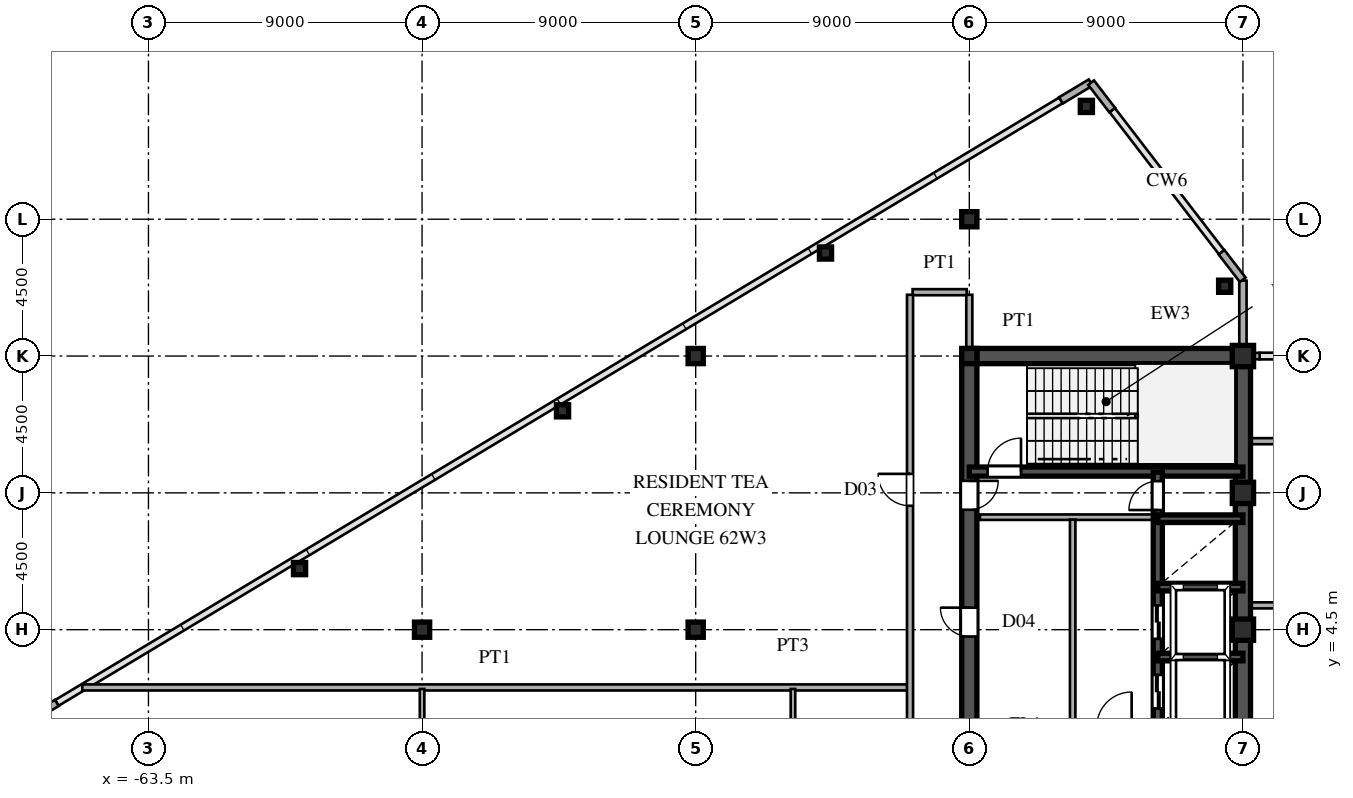
"""IFC4 building model, lengths in metres.
Left out: names, types, materials, properties, quantities, classifications, styles, units other than length and angle.
Written with IfcOpenShell. Run it as: python <this file> out.ifc"""

import sys

from ifc_helpers import new_model, si_unit, direction, frame, frame_2d, origin, origin_2d, place, context, subcontext, project, spatial, rectangle, hollow_rectangle, i_section, extrude, source, transform, mapped, element, fill, save


model = new_model("IFC4")
c1 = context("Model", 3, precision=1e-05, world=origin(), true_north=direction((0.0, 1.0)))
c2 = subcontext(c1, "Body", "Model", "MODEL_VIEW")
j1 = project(units=[si_unit("LENGTHUNIT", "METRE"), si_unit("PLANEANGLEUNIT", "RADIAN")], contexts=[c1])
p1 = place(None, origin())
s1 = spatial("IfcSite", under=j1, at=p1, CompositionType="ELEMENT")
p2 = place(p1, origin())
s2 = spatial("IfcBuilding", under=s1, at=p2, CompositionType="ELEMENT")
p3 = place(p2, frame((0.0, 0.0, 234.6)))
s3 = spatial("IfcBuildingStorey", under=s2, at=p3, CompositionType="ELEMENT", Elevation=234.6)
m1 = source(origin(), c2, "Body", "SweptSolid", [
    extrude(hollow_rectangle(XDim=0.7, YDim=0.7, WallThickness=0.03, at=origin_2d()), origin(), (0.0, 0.0, 1.0), 4.8),
])
for number, where, z_axis, x_axis in (
    (1, (-27.5, 4.5, 0.0), (0.0, 0.0, 1.0), (1.0, 0.0, 0.0)),
    (2, (-27.5, 9.0, 0.0), (0.0, 0.0, 1.0), (1.0, 0.0, 0.0)),
    (3, (-27.5, 13.5, 0.0), (0.0, 0.0, 1.0), (1.0, 0.0, 0.0)),
):
    element("IfcColumn", number, at=place(p3, frame(where, z_axis=z_axis, x_axis=x_axis)), inside=s3, PredefinedType="COLUMN", context=c2, shape_type="MappedRepresentation", body=[
        mapped(m1, transform((0.0, 0.0, 0.0), scale=1.0)),
    ])
m2 = source(origin(), c2, "Body", "SweptSolid", [
    extrude(i_section(OverallWidth=0.5, OverallDepth=0.5, WebThickness=0.02, FlangeThickness=0.032, at=origin_2d()), origin(), (0.0, 0.0, 1.0), 4.8),
])
for number, where, z_axis, x_axis in (
    (4, (-36.5, 13.5, 0.0), (0.0, 0.0, 1.0), (1.0, 0.0, 0.0)),
    (5, (-36.5, 18.0, 0.0), (0.0, 0.0, 1.0), (1.0, 0.0, 0.0)),
    (6, (-45.5, 4.5, 0.0), (0.0, 0.0, 1.0), (1.0, 0.0, 0.0)),
    (7, (-45.5, 13.5, 0.0), (0.0, 0.0, 1.0), (1.0, 0.0, 0.0)),
    (8, (-54.5, 4.5, 0.0), (0.0, 0.0, 1.0), (1.0, 0.0, 0.0)),
):
    element("IfcColumn", number, at=place(p3, frame(where, z_axis=z_axis, x_axis=x_axis)), inside=s3, PredefinedType="COLUMN", context=c2, shape_type="MappedRepresentation", body=[
        mapped(m2, transform((0.0, 0.0, 0.0), scale=1.0)),
    ])
m3 = source(origin(), c2, "Body", "SweptSolid", [
    extrude(hollow_rectangle(XDim=0.4, YDim=0.4, WallThickness=0.016, at=origin_2d()), origin(), (0.0, 0.0, 1.0), 4.8),
])
for number, where, z_axis, x_axis in (
    (9, (-28.1, 15.796, 0.0), (0.0, 0.0, 1.0), (1.0, 0.0, 0.0)),
    (10, (-32.65, 21.71, 0.0), (0.0, 0.0, 1.0), (1.0, 0.0, 0.0)),
    (11, (-41.23, 16.889, 0.0), (0.0, 0.0, 1.0), (1.0, 0.0, 0.0)),
    (12, (-49.88, 11.699, 0.0), (0.0, 0.0, 1.0), (1.0, 0.0, 0.0)),
    (13, (-58.53, 6.509, 0.0), (0.0, 0.0, 1.0), (1.0, 0.0, 0.0)),
):
    element("IfcColumn", number, at=place(p3, frame(where, z_axis=z_axis, x_axis=x_axis)), inside=s3, PredefinedType="COLUMN", context=c2, shape_type="MappedRepresentation", body=[
        mapped(m3, transform((0.0, 0.0, 0.0), scale=1.0)),
    ])
p4 = place(p3, frame((-27.5, 13.755, 0.0), z_axis=(0.0, 0.0, 1.0), x_axis=(0.0, 1.0, 0.0)))
e14 = element("IfcWall", 14, at=p4, inside=s3, PredefinedType="SOLIDWALL", context=c2, shape_type="SweptSolid", body=[
    extrude(rectangle(XDim=0.62, YDim=0.24, at=frame_2d((0.31, 0.0))), origin(), (0.0, 0.0, 1.0), 4.08),
])
p5 = place(p3, frame((-27.5, 14.375, 0.0), z_axis=(0.0, 0.0, 1.0), x_axis=(0.0, 1.0, 0.0)))
e15 = element("IfcWall", 15, at=p5, inside=s3, PredefinedType="SOLIDWALL", context=c2, shape_type="SweptSolid", body=[
    extrude(rectangle(XDim=1.605, YDim=0.24, at=frame_2d((0.803, 0.0))), origin(), (0.0, 0.0, 1.0), 4.58),
])
for number, where, z_axis, x_axis in (
    (16, (-27.506, 16.008, 0.0), (0.0, 0.0, 1.0), (-0.61, 0.793, 0.0)),
    (17, (-31.799, 21.588, 0.0), (0.0, 0.0, 1.0), (-0.61, 0.793, 0.0)),
    (18, (-32.509, 22.495, 0.0), (0.0, 0.0, 1.0), (-0.857, -0.515, 0.0)),
    (19, (-66.514, 2.092, 0.0), (0.0, 0.0, 1.0), (-0.857, -0.515, 0.0)),
):
    element("IfcWall", number, at=place(p3, frame(where, z_axis=z_axis, x_axis=x_axis)), inside=s3, PredefinedType="SOLIDWALL", context=c2, shape_type="SweptSolid", body=[
        extrude(rectangle(XDim=1.14, YDim=0.24, at=frame_2d((0.57, 0.0))), origin(), (0.0, 0.0, 1.0), 4.58),
    ])
p6 = place(p3, frame((-27.49, 13.5, 0.0), z_axis=(0.0, 0.0, 1.0), x_axis=(1.0, 0.0, 0.0)))
e20 = element("IfcWall", 20, at=p6, inside=s3, PredefinedType="SOLIDWALL", context=c2, shape_type="SweptSolid", body=[
    extrude(rectangle(XDim=0.54, YDim=0.21, at=frame_2d((0.27, 0.0))), origin(), (0.0, 0.0, 1.0), 2.78),
])
p7 = place(p3, frame((-27.5, 1.3, 0.0), z_axis=(0.0, 0.0, 1.0), x_axis=(0.0, 1.0, 0.0)))
e21 = element("IfcWall", 21, at=p7, inside=s3, PredefinedType="SHEAR", context=c2, shape_type="SweptSolid", body=[
    extrude(rectangle(XDim=12.2, YDim=0.5, at=frame_2d((6.1, 0.0))), origin(), (0.0, 0.0, 1.0), 4.58),
])
p8 = place(p3, frame((-36.5, 13.5, 0.0), z_axis=(0.0, 0.0, 1.0), x_axis=(1.0, 0.0, 0.0)))
e22 = element("IfcWall", 22, at=p8, inside=s3, PredefinedType="SHEAR", context=c2, shape_type="SweptSolid", body=[
    extrude(rectangle(XDim=9.0, YDim=0.5, at=frame_2d((4.5, 0.0))), origin(), (0.0, 0.0, 1.0), 4.58),
])
p9 = place(p3, frame((-36.5, 8.2, 0.0), z_axis=(0.0, 0.0, 1.0), x_axis=(0.0, 1.0, 0.0)))
e23 = element("IfcWall", 23, at=p9, inside=s3, PredefinedType="SHEAR", context=c2, shape_type="SweptSolid", body=[
    extrude(rectangle(XDim=5.45, YDim=0.5, at=frame_2d((2.725, 0.0))), origin(), (0.0, 0.0, 1.0), 4.58),
])
p10 = place(p9, frame((0.245, 0.0, 0.0)))
e24 = element("IfcOpeningElement", 24, at=p10, cuts=e23, PredefinedType="OPENING", context=c2, shape_type="SweptSolid", body=[
    extrude(rectangle(XDim=0.95, YDim=2.15, at=frame_2d((0.475, 1.075))), frame((0.0, 0.26, 0.0), z_axis=(0.0, -1.0, 0.0), x_axis=(1.0, 0.0, 0.0)), (0.0, 0.0, 1.0), 0.52),
])
p11 = place(p3, frame((-36.5, 1.3, 0.0), z_axis=(0.0, 0.0, 1.0), x_axis=(0.0, 1.0, 0.0)))
e25 = element("IfcWall", 25, at=p11, inside=s3, PredefinedType="SHEAR", context=c2, shape_type="SweptSolid", body=[
    extrude(rectangle(XDim=6.9, YDim=0.5, at=frame_2d((3.45, 0.0))), origin(), (0.0, 0.0, 1.0), 4.58),
])
p12 = place(p11, frame((2.975, 0.0, 0.0)))
e26 = element("IfcOpeningElement", 26, at=p12, cuts=e25, PredefinedType="OPENING", context=c2, shape_type="SweptSolid", body=[
    extrude(rectangle(XDim=0.95, YDim=2.15, at=frame_2d((0.475, 1.075))), frame((0.0, 0.26, 0.0), z_axis=(0.0, -1.0, 0.0), x_axis=(1.0, 0.0, 0.0)), (0.0, 0.0, 1.0), 0.52),
])
p13 = place(p3, frame((-36.5, 9.7, 0.0), z_axis=(0.0, 0.0, 1.0), x_axis=(1.0, 0.0, 0.0)))
e27 = element("IfcWall", 27, at=p13, inside=s3, PredefinedType="SHEAR", context=c2, shape_type="SweptSolid", body=[
    extrude(rectangle(XDim=9.0, YDim=0.3, at=frame_2d((4.5, 0.0))), origin(), (0.0, 0.0, 1.0), 4.58),
])
p14 = place(p13, frame((0.6, 0.0, 0.0)))
e28 = element("IfcOpeningElement", 28, at=p14, cuts=e27, PredefinedType="OPENING", context=c2, shape_type="SweptSolid", body=[
    extrude(rectangle(XDim=1.1, YDim=2.2, at=frame_2d((0.55, 1.1))), frame((0.0, 0.16, 0.0), z_axis=(0.0, -1.0, 0.0), x_axis=(1.0, 0.0, 0.0)), (0.0, 0.0, 1.0), 0.32),
])
for number, where, z_axis, x_axis in (
    (29, (-30.3, 3.6, 0.0), (0.0, 0.0, 1.0), (1.0, 0.0, 0.0)),
    (30, (-30.3, 5.9, 0.0), (0.0, 0.0, 1.0), (1.0, 0.0, 0.0)),
    (31, (-30.3, 8.15, 0.0), (0.0, 0.0, 1.0), (1.0, 0.0, 0.0)),
):
    element("IfcWall", number, at=place(p3, frame(where, z_axis=z_axis, x_axis=x_axis)), inside=s3, PredefinedType="SHEAR", context=c2, shape_type="SweptSolid", body=[
        extrude(rectangle(XDim=2.8, YDim=0.25, at=frame_2d((1.4, 0.0))), origin(), (0.0, 0.0, 1.0), 4.58),
    ])
p15 = place(p3, frame((-30.3, 1.32, 0.0), z_axis=(0.0, 0.0, 1.0), x_axis=(0.0, 1.0, 0.0)))
e32 = element("IfcWall", 32, at=p15, inside=s3, PredefinedType="SHEAR", context=c2, shape_type="SweptSolid", body=[
    extrude(rectangle(XDim=2.28, YDim=0.3, at=frame_2d((1.14, 0.0))), origin(), (0.0, 0.0, 1.0), 4.58),
])
p16 = place(p15, frame((0.59, 0.0, 0.0)))
e33 = element("IfcOpeningElement", 33, at=p16, cuts=e32, PredefinedType="OPENING", context=c2, shape_type="SweptSolid", body=[
    extrude(rectangle(XDim=1.1, YDim=2.2, at=frame_2d((0.55, 1.1))), frame((0.0, 0.16, 0.0), z_axis=(0.0, -1.0, 0.0), x_axis=(1.0, 0.0, 0.0)), (0.0, 0.0, 1.0), 0.32),
])
p17 = place(p3, frame((-30.3, 3.6, 0.0), z_axis=(0.0, 0.0, 1.0), x_axis=(0.0, 1.0, 0.0)))
e34 = element("IfcWall", 34, at=p17, inside=s3, PredefinedType="SHEAR", context=c2, shape_type="SweptSolid", body=[
    extrude(rectangle(XDim=2.3, YDim=0.3, at=frame_2d((1.15, 0.0))), origin(), (0.0, 0.0, 1.0), 4.58),
])
p18 = place(p17, frame((0.6, 0.0, 0.0)))
e35 = element("IfcOpeningElement", 35, at=p18, cuts=e34, PredefinedType="OPENING", context=c2, shape_type="SweptSolid", body=[
    extrude(rectangle(XDim=1.1, YDim=2.2, at=frame_2d((0.55, 1.1))), frame((0.0, 0.16, 0.0), z_axis=(0.0, -1.0, 0.0), x_axis=(1.0, 0.0, 0.0)), (0.0, 0.0, 1.0), 0.32),
])
p19 = place(p3, frame((-30.3, 5.9, 0.0), z_axis=(0.0, 0.0, 1.0), x_axis=(0.0, 1.0, 0.0)))
e36 = element("IfcWall", 36, at=p19, inside=s3, PredefinedType="SHEAR", context=c2, shape_type="SweptSolid", body=[
    extrude(rectangle(XDim=2.25, YDim=0.3, at=frame_2d((1.125, 0.0))), origin(), (0.0, 0.0, 1.0), 4.58),
])
p20 = place(p3, frame((-30.3, 8.15, 0.0), z_axis=(0.0, 0.0, 1.0), x_axis=(0.0, 1.0, 0.0)))
e37 = element("IfcWall", 37, at=p20, inside=s3, PredefinedType="SHEAR", context=c2, shape_type="SweptSolid", body=[
    extrude(rectangle(XDim=1.53, YDim=0.3, at=frame_2d((0.765, 0.0))), origin(), (0.0, 0.0, 1.0), 4.58),
])
p21 = place(p20, frame((0.285, 0.0, 0.0)))
e38 = element("IfcOpeningElement", 38, at=p21, cuts=e37, PredefinedType="OPENING", context=c2, shape_type="SweptSolid", body=[
    extrude(rectangle(XDim=0.95, YDim=2.15, at=frame_2d((0.475, 1.075))), frame((0.0, 0.16, 0.0), z_axis=(0.0, -1.0, 0.0), x_axis=(1.0, 0.0, 0.0)), (0.0, 0.0, 1.0), 0.32),
])
p22 = place(p3, frame((-36.15, 8.2, 0.0), z_axis=(0.0, 0.0, 1.0), x_axis=(1.0, 0.0, 0.0)))
e39 = element("IfcWall", 39, at=p22, inside=s3, PredefinedType="PARTITIONING", context=c2, shape_type="SweptSolid", body=[
    extrude(rectangle(XDim=5.7, YDim=0.18, at=frame_2d((2.85, 0.0))), origin(), (0.0, 0.0, 1.0), 4.58),
])
p23 = place(p3, frame((-33.1, 1.38, 0.0), z_axis=(0.0, 0.0, 1.0), x_axis=(0.0, 1.0, 0.0)))
e40 = element("IfcWall", 40, at=p23, inside=s3, PredefinedType="PARTITIONING", context=c2, shape_type="SweptSolid", body=[
    extrude(rectangle(XDim=6.74, YDim=0.18, at=frame_2d((3.37, 0.0))), origin(), (0.0, 0.0, 1.0), 4.58),
])
p24 = place(p3, frame((-65.676, 2.6, 0.0), z_axis=(0.0, 0.0, 1.0), x_axis=(1.0, 0.0, 0.0)))
e41 = element("IfcWall", 41, at=p24, inside=s3, PredefinedType="PARTITIONING", context=c2, shape_type="SweptSolid", body=[
    extrude(rectangle(XDim=27.146, YDim=0.2, at=frame_2d((13.573, 0.0))), origin(), (0.0, 0.0, 1.0), 4.58),
])
p25 = place(p3, frame((-27.245, 5.3, 0.0), z_axis=(0.0, 0.0, 1.0), x_axis=(1.0, 0.0, 0.0)))
e42 = element("IfcWall", 42, at=p25, inside=s3, PredefinedType="PARTITIONING", context=c2, shape_type="SweptSolid", body=[
    extrude(rectangle(XDim=54.49, YDim=0.2, at=frame_2d((27.245, 0.0))), origin(), (0.0, 0.0, 1.0), 4.58),
])
p26 = place(p25, frame((25.77, 0.0, 0.0)))
e43 = element("IfcOpeningElement", 43, at=p26, cuts=e42, PredefinedType="OPENING", context=c2, shape_type="SweptSolid", body=[
    extrude(rectangle(XDim=1.15, YDim=2.2, at=frame_2d((0.575, 1.1))), frame((0.0, 0.11, 0.0), z_axis=(0.0, -1.0, 0.0), x_axis=(1.0, 0.0, 0.0)), (0.0, 0.0, 1.0), 0.22),
])
p27 = place(p25, frame((35.17, 0.0, 0.0)))
e44 = element("IfcOpeningElement", 44, at=p27, cuts=e42, PredefinedType="OPENING", context=c2, shape_type="SweptSolid", body=[
    extrude(rectangle(XDim=1.15, YDim=2.2, at=frame_2d((0.575, 1.1))), frame((0.0, 0.11, 0.0), z_axis=(0.0, -1.0, 0.0), x_axis=(1.0, 0.0, 0.0)), (0.0, 0.0, 1.0), 0.22),
])
p28 = place(p25, frame((17.67, 0.0, 0.0)))
e45 = element("IfcOpeningElement", 45, at=p28, cuts=e42, PredefinedType="OPENING", context=c2, shape_type="SweptSolid", body=[
    extrude(rectangle(XDim=1.15, YDim=2.2, at=frame_2d((0.575, 1.1))), frame((0.0, 0.11, 0.0), z_axis=(0.0, -1.0, 0.0), x_axis=(1.0, 0.0, 0.0)), (0.0, 0.0, 1.0), 0.22),
])
p29 = place(p25, frame((46.055, 0.0, 0.0)))
e46 = element("IfcOpeningElement", 46, at=p29, cuts=e42, PredefinedType="OPENING", context=c2, shape_type="SweptSolid", body=[
    extrude(rectangle(XDim=0.88, YDim=2.1, at=frame_2d((0.44, 1.05))), frame((0.0, 0.11, 0.0), z_axis=(0.0, -1.0, 0.0), x_axis=(1.0, 0.0, 0.0)), (0.0, 0.0, 1.0), 0.22),
])
p30 = place(p25, frame((51.405, 0.0, 0.0)))
e47 = element("IfcOpeningElement", 47, at=p30, cuts=e42, PredefinedType="OPENING", context=c2, shape_type="SweptSolid", body=[
    extrude(rectangle(XDim=0.88, YDim=2.1, at=frame_2d((0.44, 1.05))), frame((0.0, 0.11, 0.0), z_axis=(0.0, -1.0, 0.0), x_axis=(1.0, 0.0, 0.0)), (0.0, 0.0, 1.0), 0.22),
])
p31 = place(p3, frame((-27.245, 10.7, 0.0), z_axis=(0.0, 0.0, 1.0), x_axis=(1.0, 0.0, 0.0)))
e48 = element("IfcWall", 48, at=p31, inside=s3, PredefinedType="PARTITIONING", context=c2, shape_type="SweptSolid", body=[
    extrude(rectangle(XDim=54.49, YDim=0.2, at=frame_2d((27.245, 0.0))), origin(), (0.0, 0.0, 1.0), 4.58),
])
p32 = place(p31, frame((25.77, 0.0, 0.0)))
e49 = element("IfcOpeningElement", 49, at=p32, cuts=e48, PredefinedType="OPENING", context=c2, shape_type="SweptSolid", body=[
    extrude(rectangle(XDim=1.15, YDim=2.2, at=frame_2d((0.575, 1.1))), frame((0.0, 0.11, 0.0), z_axis=(0.0, -1.0, 0.0), x_axis=(1.0, 0.0, 0.0)), (0.0, 0.0, 1.0), 0.22),
])
p33 = place(p3, frame((-38.365, 15.6, 0.0), z_axis=(0.0, 0.0, 1.0), x_axis=(1.0, 0.0, 0.0)))
e50 = element("IfcWall", 50, at=p33, inside=s3, PredefinedType="PARTITIONING", context=c2, shape_type="SweptSolid", body=[
    extrude(rectangle(XDim=1.78, YDim=0.2, at=frame_2d((0.89, 0.0))), origin(), (0.0, 0.0, 1.0), 4.58),
])
p34 = place(p3, frame((-54.5, -9.335, 0.0), z_axis=(0.0, 0.0, 1.0), x_axis=(0.0, 1.0, 0.0)))
e51 = element("IfcWall", 51, at=p34, inside=s3, PredefinedType="PARTITIONING", context=c2, shape_type="SweptSolid", body=[
    extrude(rectangle(XDim=11.885, YDim=0.15, at=frame_2d((5.942, 0.0))), origin(), (0.0, 0.0, 1.0), 3.98),
])
p35 = place(p34, frame((5.16, 0.0, 0.0)))
e52 = element("IfcOpeningElement", 52, at=p35, cuts=e51, PredefinedType="OPENING", context=c2, shape_type="SweptSolid", body=[
    extrude(rectangle(XDim=0.95, YDim=2.15, at=frame_2d((0.475, 1.075))), frame((0.0, 0.085, 0.0), z_axis=(0.0, -1.0, 0.0), x_axis=(1.0, 0.0, 0.0)), (0.0, 0.0, 1.0), 0.17),
])
p36 = place(p3, frame((-42.3, -1.128, 0.0), z_axis=(0.0, 0.0, 1.0), x_axis=(0.0, 1.0, 0.0)))
e53 = element("IfcWall", 53, at=p36, inside=s3, PredefinedType="PARTITIONING", context=c2, shape_type="SweptSolid", body=[
    extrude(rectangle(XDim=3.678, YDim=0.15, at=frame_2d((1.839, 0.0))), origin(), (0.0, 0.0, 1.0), 4.58),
])
p37 = place(p3, frame((-38.45, -15.515, 0.0), z_axis=(0.0, 0.0, 1.0), x_axis=(0.0, 1.0, 0.0)))
e54 = element("IfcWall", 54, at=p37, inside=s3, PredefinedType="PARTITIONING", context=c2, shape_type="SweptSolid", body=[
    extrude(rectangle(XDim=31.03, YDim=0.2, at=frame_2d((15.515, 0.0))), origin(), (0.0, 0.0, 1.0), 4.58),
])
p38 = place(p37, frame((2.19, 0.0, 0.0)))
e55 = element("IfcOpeningElement", 55, at=p38, cuts=e54, PredefinedType="OPENING", context=c2, shape_type="SweptSolid", body=[
    extrude(rectangle(XDim=1.05, YDim=2.25, at=frame_2d((0.525, 1.125))), frame((0.0, 0.11, 0.0), z_axis=(0.0, -1.0, 0.0), x_axis=(1.0, 0.0, 0.0)), (0.0, 0.0, 1.0), 0.22),
])
p39 = place(p37, frame((11.101, 0.0, 0.0)))
e56 = element("IfcOpeningElement", 56, at=p39, cuts=e54, PredefinedType="OPENING", context=c2, shape_type="SweptSolid", body=[
    extrude(rectangle(XDim=1.05, YDim=2.25, at=frame_2d((0.525, 1.125))), frame((0.0, 0.11, 0.0), z_axis=(0.0, -1.0, 0.0), x_axis=(1.0, 0.0, 0.0)), (0.0, 0.0, 1.0), 0.22),
])
p40 = place(p37, frame((24.09, 0.0, 0.0)))
e57 = element("IfcOpeningElement", 57, at=p40, cuts=e54, PredefinedType="OPENING", context=c2, shape_type="SweptSolid", body=[
    extrude(rectangle(XDim=1.05, YDim=2.25, at=frame_2d((0.525, 1.125))), frame((0.0, 0.11, 0.0), z_axis=(0.0, -1.0, 0.0), x_axis=(1.0, 0.0, 0.0)), (0.0, 0.0, 1.0), 0.22),
])
p41 = place(p3, frame((-36.5, 13.755, 0.0), z_axis=(0.0, 0.0, 1.0), x_axis=(0.0, 1.0, 0.0)))
e58 = element("IfcWall", 58, at=p41, inside=s3, PredefinedType="PARTITIONING", context=c2, shape_type="SweptSolid", body=[
    extrude(rectangle(XDim=1.76, YDim=0.2, at=frame_2d((0.88, 0.0))), origin(), (0.0, 0.0, 1.0), 3.98),
])
m4 = source(origin(), c2, "Body", "SweptSolid", [
    extrude(rectangle(XDim=0.95, YDim=2.15, at=frame_2d((0.475, 1.075))), frame((0.0, 0.025, 0.0), z_axis=(0.0, -1.0, 0.0), x_axis=(1.0, 0.0, 0.0)), (0.0, 0.0, 1.0), 0.05),
])
p42 = place(p10, frame((0.95, 0.0, 0.0), z_axis=(0.0, 0.0, 1.0), x_axis=(-1.0, 0.0, 0.0)))
e59 = element("IfcDoor", 59, at=p42, inside=s3, OperationType="SINGLE_SWING_RIGHT", PredefinedType="DOOR", context=c2, shape_type="MappedRepresentation", body=[
    mapped(m4, transform((0.0, 0.0, 0.0), scale=1.0)),
])
fill(e24, e59)
p43 = place(p12, origin())
e60 = element("IfcDoor", 60, at=p43, inside=s3, OperationType="SINGLE_SWING_RIGHT", PredefinedType="DOOR", context=c2, shape_type="MappedRepresentation", body=[
    mapped(m4, transform((0.0, 0.0, 0.0), scale=1.0)),
])
fill(e26, e60)
m5 = source(origin(), c2, "Body", "SweptSolid", [
    extrude(rectangle(XDim=1.1, YDim=2.2, at=frame_2d((0.55, 1.1))), frame((0.0, 0.025, 0.0), z_axis=(0.0, -1.0, 0.0), x_axis=(1.0, 0.0, 0.0)), (0.0, 0.0, 1.0), 0.05),
])
p44 = place(p14, origin())
e61 = element("IfcDoor", 61, at=p44, inside=s3, OperationType="SINGLE_SWING_RIGHT", PredefinedType="DOOR", context=c2, shape_type="MappedRepresentation", body=[
    mapped(m5, transform((0.0, 0.0, 0.0), scale=1.0)),
])
fill(e28, e61)
m6 = source(origin(), c2, "Body", "SweptSolid", [
    extrude(rectangle(XDim=1.1, YDim=2.2, at=frame_2d((0.55, 1.1))), frame((0.0, 0.025, 0.0), z_axis=(0.0, -1.0, 0.0), x_axis=(1.0, 0.0, 0.0)), (0.0, 0.0, 1.0), 0.05),
])
p45 = place(p16, origin())
e62 = element("IfcDoor", 62, at=p45, inside=s3, OperationType="DOUBLE_DOOR_SLIDING", PredefinedType="DOOR", context=c2, shape_type="MappedRepresentation", body=[
    mapped(m6, transform((0.0, 0.0, 0.0), scale=1.0)),
])
fill(e33, e62)
p46 = place(p18, origin())
e63 = element("IfcDoor", 63, at=p46, inside=s3, OperationType="DOUBLE_DOOR_SLIDING", PredefinedType="DOOR", context=c2, shape_type="MappedRepresentation", body=[
    mapped(m6, transform((0.0, 0.0, 0.0), scale=1.0)),
])
fill(e35, e63)
p47 = place(p21, origin())
e64 = element("IfcDoor", 64, at=p47, inside=s3, OperationType="SINGLE_SWING_LEFT", PredefinedType="DOOR", context=c2, shape_type="MappedRepresentation", body=[
    mapped(m4, transform((0.0, 0.0, 0.0), scale=1.0)),
])
fill(e38, e64)
m7 = source(origin(), c2, "Body", "SweptSolid", [
    extrude(rectangle(XDim=1.05, YDim=2.25, at=frame_2d((0.525, 1.125))), frame((0.0, 0.025, 0.0), z_axis=(0.0, -1.0, 0.0), x_axis=(1.0, 0.0, 0.0)), (0.0, 0.0, 1.0), 0.05),
])
p48 = place(p40, origin())
e65 = element("IfcDoor", 65, at=p48, inside=s3, OperationType="SINGLE_SWING_RIGHT", PredefinedType="DOOR", context=c2, shape_type="MappedRepresentation", body=[
    mapped(m7, transform((0.0, 0.0, 0.0), scale=1.0)),
])
fill(e57, e65)
save(model, sys.argv[1])
